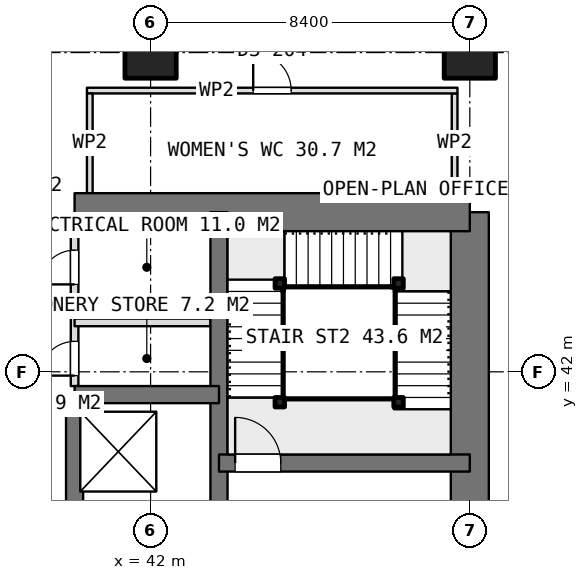
"""IFC4 building model, lengths in metres.
Left out: names, types, materials, properties, quantities, classifications, styles, units other than length and angle.
Written with IfcOpenShell. Run it as: python <this file> out.ifc"""

import sys

from ifc_helpers import new_model, si_unit, direction, frame, frame_2d, origin, origin_2d, place, context, subcontext, project, spatial, rectangle, extrude, element, fill, save


model = new_model("IFC4")
c1 = context("Model", 3, precision=1e-05, world=origin(), true_north=direction((0.0, 1.0)))
c2 = subcontext(c1, "Body", "Model", "MODEL_VIEW")
j1 = project(units=[si_unit("LENGTHUNIT", "METRE"), si_unit("PLANEANGLEUNIT", "RADIAN")], contexts=[c1])
p1 = place(None, origin())
s1 = spatial("IfcSite", under=j1, at=p1, CompositionType="ELEMENT")
p2 = place(p1, origin())
s2 = spatial("IfcBuilding", under=s1, at=p2, CompositionType="ELEMENT")
p3 = place(p2, frame((0.0, 0.0, 191.45)))
s3 = spatial("IfcBuildingStorey", under=s2, at=p3, CompositionType="ELEMENT", Elevation=191.45)
p4 = place(p3, frame((40.0, 46.2, 0.0), z_axis=(0.0, 0.0, 1.0), x_axis=(1.0, 0.0, 0.0)))
e1 = element("IfcWall", 1, at=p4, inside=s3, PredefinedType="SHEAR", context=c2, shape_type="SweptSolid", body=[
    extrude(rectangle(XDim=10.4, YDim=1.0, at=frame_2d((5.2, 0.0))), origin(), (0.0, 0.0, 1.0), 3.75),
])
p5 = place(p3, frame((50.4, 21.0, 0.0), z_axis=(0.0, 0.0, 1.0), x_axis=(0.0, 1.0, 0.0)))
e2 = element("IfcWall", 2, at=p5, inside=s3, PredefinedType="SHEAR", context=c2, shape_type="SweptSolid", body=[
    extrude(rectangle(XDim=25.2, YDim=1.0, at=frame_2d((12.6, 0.0))), origin(), (0.0, 0.0, 1.0), 3.75),
])
p6 = place(p5, frame((16.2, 0.0, 0.0)))
e3 = element("IfcOpeningElement", 3, at=p6, cuts=e2, PredefinedType="OPENING", context=c2, shape_type="SweptSolid", body=[
    extrude(rectangle(XDim=1.2, YDim=2.1, at=frame_2d((0.6, 1.05))), frame((0.0, 0.51, 0.0), z_axis=(0.0, -1.0, 0.0), x_axis=(1.0, 0.0, 0.0)), (0.0, 0.0, 1.0), 1.02),
])
p7 = place(p5, frame((10.05, 0.0, 0.0)))
e4 = element("IfcOpeningElement", 4, at=p7, cuts=e2, PredefinedType="OPENING", context=c2, shape_type="SweptSolid", body=[
    extrude(rectangle(XDim=0.9, YDim=2.1, at=frame_2d((0.45, 1.05))), frame((0.0, 0.51, 0.0), z_axis=(0.0, -1.0, 0.0), x_axis=(1.0, 0.0, 0.0)), (0.0, 0.0, 1.0), 1.02),
])
p8 = place(p5, frame((7.45, 0.0, 0.0)))
e5 = element("IfcOpeningElement", 5, at=p8, cuts=e2, PredefinedType="OPENING", context=c2, shape_type="SweptSolid", body=[
    extrude(rectangle(XDim=0.9, YDim=2.1, at=frame_2d((0.45, 1.05))), frame((0.0, 0.51, 0.0), z_axis=(0.0, -1.0, 0.0), x_axis=(1.0, 0.0, 0.0)), (0.0, 0.0, 1.0), 1.02),
])
p9 = place(p5, frame((0.7, 0.0, 0.0)))
e6 = element("IfcOpeningElement", 6, at=p9, cuts=e2, PredefinedType="OPENING", context=c2, shape_type="SweptSolid", body=[
    extrude(rectangle(XDim=1.2, YDim=2.1, at=frame_2d((0.6, 1.05))), frame((0.0, 0.51, 0.0), z_axis=(0.0, -1.0, 0.0), x_axis=(1.0, 0.0, 0.0)), (0.0, 0.0, 1.0), 1.02),
])
p10 = place(p3, frame((43.8, 21.0, 0.0), z_axis=(0.0, 0.0, 1.0), x_axis=(0.0, 1.0, 0.0)))
e7 = element("IfcWall", 7, at=p10, inside=s3, PredefinedType="SHEAR", context=c2, shape_type="SweptSolid", body=[
    extrude(rectangle(XDim=25.2, YDim=0.45, at=frame_2d((12.6, 0.0))), origin(), (0.0, 0.0, 1.0), 3.75),
])
p11 = place(p3, frame((40.0, 23.4, 0.0), z_axis=(0.0, 0.0, 1.0), x_axis=(0.0, 1.0, 0.0)))
e8 = element("IfcWall", 8, at=p11, inside=s3, PredefinedType="SHEAR", context=c2, shape_type="SweptSolid", body=[
    extrude(rectangle(XDim=18.0, YDim=0.45, at=frame_2d((9.0, 0.0))), origin(), (0.0, 0.0, 1.0), 3.75),
])
p12 = place(p11, frame((3.15, 0.0, 0.0)))
e9 = element("IfcOpeningElement", 9, at=p12, cuts=e8, PredefinedType="OPENING", context=c2, shape_type="SweptSolid", body=[
    extrude(rectangle(XDim=0.9, YDim=2.1, at=frame_2d((0.45, 1.05))), frame((0.0, 0.235, 0.0), z_axis=(0.0, -1.0, 0.0), x_axis=(1.0, 0.0, 0.0)), (0.0, 0.0, 1.0), 0.47),
])
p13 = place(p11, frame((9.15, 0.0, 0.0)))
e10 = element("IfcOpeningElement", 10, at=p13, cuts=e8, PredefinedType="OPENING", context=c2, shape_type="SweptSolid", body=[
    extrude(rectangle(XDim=0.9, YDim=2.1, at=frame_2d((0.45, 1.05))), frame((0.0, 0.235, 0.0), z_axis=(0.0, -1.0, 0.0), x_axis=(1.0, 0.0, 0.0)), (0.0, 0.0, 1.0), 0.47),
])
p14 = place(p3, frame((40.0, 41.4, 0.0), z_axis=(0.0, 0.0, 1.0), x_axis=(1.0, 0.0, 0.0)))
e11 = element("IfcWall", 11, at=p14, inside=s3, PredefinedType="SHEAR", context=c2, shape_type="SweptSolid", body=[
    extrude(rectangle(XDim=3.8, YDim=0.45, at=frame_2d((1.9, 0.0))), origin(), (0.0, 0.0, 1.0), 3.75),
])
p15 = place(p3, frame((43.8, 39.6, 0.0), z_axis=(0.0, 0.0, 1.0), x_axis=(1.0, 0.0, 0.0)))
e12 = element("IfcWall", 12, at=p15, inside=s3, PredefinedType="SHEAR", context=c2, shape_type="SweptSolid", body=[
    extrude(rectangle(XDim=6.6, YDim=0.45, at=frame_2d((3.3, 0.0))), origin(), (0.0, 0.0, 1.0), 3.75),
])
p16 = place(p15, frame((0.425, 0.0, 0.0)))
e13 = element("IfcOpeningElement", 13, at=p16, cuts=e12, PredefinedType="OPENING", context=c2, shape_type="SweptSolid", body=[
    extrude(rectangle(XDim=1.2, YDim=2.1, at=frame_2d((0.6, 1.05))), frame((0.0, 0.235, 0.0), z_axis=(0.0, -1.0, 0.0), x_axis=(1.0, 0.0, 0.0)), (0.0, 0.0, 1.0), 0.47),
])
for number, where, z_axis, x_axis in (
    (14, (42.0, 50.4, 0.0), (0.0, 0.0, 1.0), (1.0, 0.0, 0.0)),
    (15, (50.4, 50.4, 0.0), (0.0, 0.0, 1.0), (1.0, 0.0, 0.0)),
):
    element("IfcColumn", number, at=place(p3, frame(where, z_axis=z_axis, x_axis=x_axis)), inside=s3, PredefinedType="COLUMN", context=c2, shape_type="SweptSolid", body=[
        extrude(rectangle(XDim=1.35, YDim=1.35, at=origin_2d()), origin(), (0.0, 0.0, 1.0), 3.75),
    ])
p17 = place(p3, frame((40.0, 41.625, 0.0), z_axis=(0.0, 0.0, 1.0), x_axis=(0.0, 1.0, 0.0)))
e16 = element("IfcWall", 16, at=p17, inside=s3, PredefinedType="PARTITIONING", context=c2, shape_type="SweptSolid", body=[
    extrude(rectangle(XDim=4.075, YDim=0.2, at=frame_2d((2.038, 0.0))), origin(), (0.0, 0.0, 1.0), 3.5),
])
p18 = place(p17, frame((2.675, 0.0, 0.0)))
e17 = element("IfcOpeningElement", 17, at=p18, cuts=e16, PredefinedType="OPENING", context=c2, shape_type="SweptSolid", body=[
    extrude(rectangle(XDim=0.9, YDim=2.1, at=frame_2d((0.45, 1.05))), frame((0.0, 0.11, 0.0), z_axis=(0.0, -1.0, 0.0), x_axis=(1.0, 0.0, 0.0)), (0.0, 0.0, 1.0), 0.22),
])
p19 = place(p17, frame((0.275, 0.0, 0.0)))
e18 = element("IfcOpeningElement", 18, at=p19, cuts=e16, PredefinedType="OPENING", context=c2, shape_type="SweptSolid", body=[
    extrude(rectangle(XDim=0.9, YDim=2.1, at=frame_2d((0.45, 1.05))), frame((0.0, 0.11, 0.0), z_axis=(0.0, -1.0, 0.0), x_axis=(1.0, 0.0, 0.0)), (0.0, 0.0, 1.0), 0.22),
])
p20 = place(p3, frame((40.0, 43.3, 0.0), z_axis=(0.0, 0.0, 1.0), x_axis=(1.0, 0.0, 0.0)))
e19 = element("IfcWall", 19, at=p20, inside=s3, PredefinedType="PARTITIONING", context=c2, shape_type="SweptSolid", body=[
    extrude(rectangle(XDim=3.575, YDim=0.2, at=frame_2d((1.788, 0.0))), origin(), (0.0, 0.0, 1.0), 3.5),
])
p21 = place(p3, frame((40.325, 49.4, 0.0), z_axis=(0.0, 0.0, 1.0), x_axis=(1.0, 0.0, 0.0)))
e20 = element("IfcWall", 20, at=p21, inside=s3, PredefinedType="PARTITIONING", context=c2, shape_type="SweptSolid", body=[
    extrude(rectangle(XDim=9.75, YDim=0.15, at=frame_2d((4.875, 0.0))), origin(), (0.0, 0.0, 1.0), 3.5),
])
p22 = place(p21, frame((4.375, 0.0, 0.0)))
e21 = element("IfcOpeningElement", 21, at=p22, cuts=e20, PredefinedType="OPENING", context=c2, shape_type="SweptSolid", body=[
    extrude(rectangle(XDim=1.0, YDim=2.1, at=frame_2d((0.5, 1.05))), frame((0.0, 0.085, 0.0), z_axis=(0.0, -1.0, 0.0), x_axis=(1.0, 0.0, 0.0)), (0.0, 0.0, 1.0), 0.17),
])
for number, where, z_axis, x_axis in (
    (22, (40.4, 46.7, 0.0), (0.0, 0.0, 1.0), (0.0, 1.0, 0.0)),
    (23, (50.0, 46.7, 0.0), (0.0, 0.0, 1.0), (0.0, 1.0, 0.0)),
):
    element("IfcWall", number, at=place(p3, frame(where, z_axis=z_axis, x_axis=x_axis)), inside=s3, PredefinedType="PARTITIONING", context=c2, shape_type="SweptSolid", body=[
        extrude(rectangle(XDim=2.625, YDim=0.15, at=frame_2d((1.312, 0.0))), origin(), (0.0, 0.0, 1.0), 3.5),
    ])
for number, where, z_axis, x_axis in (
    (24, (45.4, 41.2, 0.0), (0.0, 0.0, 1.0), (1.0, 0.0, 0.0)),
    (25, (45.4, 44.325, 0.0), (0.0, 0.0, 1.0), (1.0, 0.0, 0.0)),
    (26, (48.525, 44.325, 0.0), (0.0, 0.0, 1.0), (1.0, 0.0, 0.0)),
    (27, (48.525, 41.2, 0.0), (0.0, 0.0, 1.0), (1.0, 0.0, 0.0)),
):
    element("IfcColumn", number, at=place(p3, frame(where, z_axis=z_axis, x_axis=x_axis)), inside=s3, PredefinedType="COLUMN", context=c2, shape_type="SweptSolid", body=[
        extrude(rectangle(XDim=0.25, YDim=0.25, at=origin_2d()), origin(), (0.0, 0.0, 1.0), 3.75),
    ])
p23 = place(p18, origin())
e28 = element("IfcDoor", 28, at=p23, inside=s3, OperationType="SINGLE_SWING_LEFT", PredefinedType="DOOR", context=c2, shape_type="SweptSolid", body=[
    extrude(rectangle(XDim=0.9, YDim=2.1, at=frame_2d((0.45, 1.05))), frame((0.0, 0.025, 0.0), z_axis=(0.0, -1.0, 0.0), x_axis=(1.0, 0.0, 0.0)), (0.0, 0.0, 1.0), 0.05),
])
fill(e17, e28)
p24 = place(p19, origin())
e29 = element("IfcDoor", 29, at=p24, inside=s3, OperationType="SINGLE_SWING_LEFT", PredefinedType="DOOR", context=c2, shape_type="SweptSolid", body=[
    extrude(rectangle(XDim=0.9, YDim=2.1, at=frame_2d((0.45, 1.05))), frame((0.0, 0.025, 0.0), z_axis=(0.0, -1.0, 0.0), x_axis=(1.0, 0.0, 0.0)), (0.0, 0.0, 1.0), 0.05),
])
fill(e18, e29)
p25 = place(p22, origin())
e30 = element("IfcDoor", 30, at=p25, inside=s3, OperationType="SINGLE_SWING_LEFT", PredefinedType="DOOR", context=c2, shape_type="SweptSolid", body=[
    extrude(rectangle(XDim=1.0, YDim=2.1, at=frame_2d((0.5, 1.05))), frame((0.0, 0.025, 0.0), z_axis=(0.0, -1.0, 0.0), x_axis=(1.0, 0.0, 0.0)), (0.0, 0.0, 1.0), 0.05),
])
fill(e21, e30)
p26 = place(p16, origin())
e31 = element("IfcDoor", 31, at=p26, inside=s3, OperationType="SINGLE_SWING_RIGHT", PredefinedType="DOOR", context=c2, shape_type="SweptSolid", body=[
    extrude(rectangle(XDim=1.2, YDim=2.1, at=frame_2d((0.6, 1.05))), frame((0.0, 0.025, 0.0), z_axis=(0.0, -1.0, 0.0), x_axis=(1.0, 0.0, 0.0)), (0.0, 0.0, 1.0), 0.05),
])
fill(e13, e31)
save(model, sys.argv[1])
